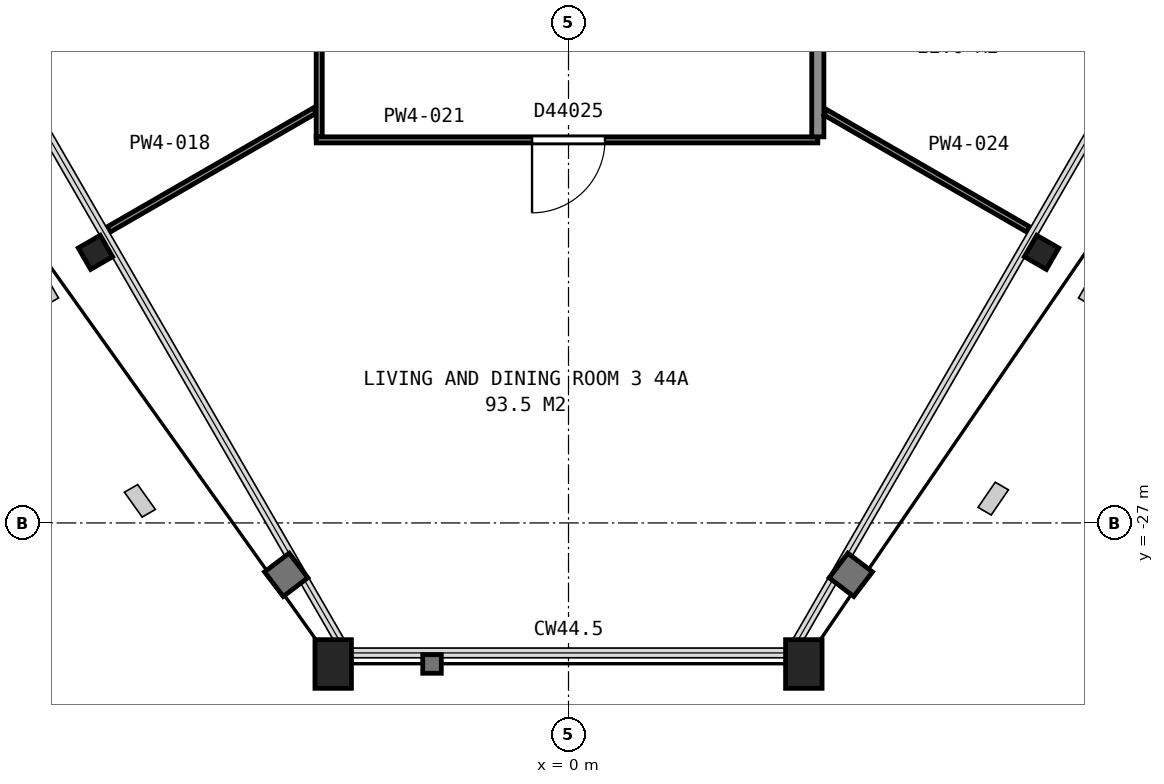
"""IFC4 building model, lengths in metres.
Left out: names, types, materials, properties, quantities, classifications, styles, units other than length and angle.
Written with IfcOpenShell. Run it as: python <this file> out.ifc"""

import sys

from ifc_helpers import new_model, si_unit, direction, frame, frame_2d, origin, origin_2d, place, context, subcontext, project, spatial, rectangle, hollow_rectangle, i_section, extrude, element, fill, save


model = new_model("IFC4")
c1 = context("Model", 3, precision=1e-05, world=origin(), true_north=direction((0.0, 1.0)))
c2 = subcontext(c1, "Body", "Model", "MODEL_VIEW")
j1 = project(units=[si_unit("LENGTHUNIT", "METRE"), si_unit("PLANEANGLEUNIT", "RADIAN")], contexts=[c1])
p1 = place(None, origin())
s1 = spatial("IfcSite", under=j1, at=p1, CompositionType="ELEMENT")
p2 = place(p1, origin())
s2 = spatial("IfcBuilding", under=s1, at=p2, CompositionType="ELEMENT")
p3 = place(p2, frame((0.0, 0.0, 178.4)))
s3 = spatial("IfcBuildingStorey", under=s2, at=p3, CompositionType="ELEMENT", Elevation=178.4)
p4 = place(p3, frame((-7.78, -22.55, 0.04), z_axis=(0.0, 0.0, 1.0), x_axis=(-0.5, 0.866025403784, 0.0)))
e1 = element("IfcColumn", 1, at=p4, inside=s3, PredefinedType="COLUMN", context=c2, shape_type="SweptSolid", body=[
    extrude(i_section(OverallWidth=0.406, OverallDepth=0.417, WebThickness=0.03, FlangeThickness=0.048, FilletRadius=0.015, at=origin_2d()), origin(), (0.0, 0.0, 1.0), 3.66),
])
for number, where, z_axis, x_axis in (
    (2, (-3.87, -29.32, 0.065), (0.0, 0.0, 1.0), (-1.0, 0.0, 0.0)),
    (3, (3.87, -29.32, 0.065), (0.0, 0.0, 1.0), (-1.0, 0.0, 0.0)),
):
    element("IfcColumn", number, at=place(p3, frame(where, z_axis=z_axis, x_axis=x_axis)), inside=s3, PredefinedType="COLUMN", context=c2, shape_type="SweptSolid", body=[
        extrude(hollow_rectangle(XDim=0.6, YDim=0.8, WallThickness=0.05, at=origin_2d()), origin(), (0.0, 0.0, 1.0), 3.635),
    ])
p5 = place(p3, frame((7.78, -22.55, 0.04), z_axis=(0.0, 0.0, 1.0), x_axis=(-0.5, -0.866025403784, 0.0)))
e4 = element("IfcColumn", 4, at=p5, inside=s3, PredefinedType="COLUMN", context=c2, shape_type="SweptSolid", body=[
    extrude(i_section(OverallWidth=0.406, OverallDepth=0.417, WebThickness=0.03, FlangeThickness=0.048, FilletRadius=0.015, at=origin_2d()), origin(), (0.0, 0.0, 1.0), 3.66),
])
p6 = place(p3, frame((-7.562, -22.173, 0.0), z_axis=(0.0, 0.0, 1.0), x_axis=(0.866079547155, 0.499906209203, 0.0)))
e5 = element("IfcWall", 5, at=p6, inside=s3, PredefinedType="PARTITIONING", context=c2, shape_type="SweptSolid", body=[
    extrude(rectangle(XDim=3.91, YDim=0.1, at=frame_2d((1.955, 0.0))), origin(), (0.0, 0.0, 1.0), 2.713),
])
p7 = place(p3, frame((-4.1, -20.65, 0.0), z_axis=(0.0, 0.0, 1.0), x_axis=(0.0, 1.0, 0.0)))
e6 = element("IfcWall", 6, at=p7, inside=s3, PredefinedType="PARTITIONING", context=c2, shape_type="SweptSolid", body=[
    extrude(rectangle(XDim=8.063, YDim=0.1, at=frame_2d((4.031, 0.0))), origin(), (0.0, 0.0, 1.0), 2.713),
])
p8 = place(p7, frame((6.892, 0.0, 0.0)))
e7 = element("IfcOpeningElement", 7, at=p8, cuts=e6, PredefinedType="OPENING", context=c2, shape_type="SweptSolid", body=[
    extrude(rectangle(XDim=0.9, YDim=2.1, at=frame_2d((0.45, 1.05))), frame((0.0, 0.06, 0.0), z_axis=(0.0, -1.0, 0.0), x_axis=(1.0, 0.0, 0.0)), (0.0, 0.0, 1.0), 0.12),
])
p9 = place(p7, frame((3.075, 0.0, 0.0)))
e8 = element("IfcOpeningElement", 8, at=p9, cuts=e6, PredefinedType="OPENING", context=c2, shape_type="SweptSolid", body=[
    extrude(rectangle(XDim=0.9, YDim=2.1, at=frame_2d((0.45, 1.05))), frame((0.0, 0.06, 0.0), z_axis=(0.0, -1.0, 0.0), x_axis=(1.0, 0.0, 0.0)), (0.0, 0.0, 1.0), 0.12),
])
p10 = place(p3, frame((4.1, -20.7, 0.0), z_axis=(0.0, 0.0, 1.0), x_axis=(-1.0, 0.0, 0.0)))
e9 = element("IfcWall", 9, at=p10, inside=s3, PredefinedType="PARTITIONING", context=c2, shape_type="SweptSolid", body=[
    extrude(rectangle(XDim=8.25, YDim=0.1, at=frame_2d((4.125, 0.0))), origin(), (0.0, 0.0, 1.0), 2.713),
])
p11 = place(p10, frame((3.5, 0.0, 0.0)))
e10 = element("IfcOpeningElement", 10, at=p11, cuts=e9, PredefinedType="OPENING", context=c2, shape_type="SweptSolid", body=[
    extrude(rectangle(XDim=1.2, YDim=2.1, at=frame_2d((0.6, 1.05))), frame((0.0, 0.06, 0.0), z_axis=(0.0, -1.0, 0.0), x_axis=(1.0, 0.0, 0.0)), (0.0, 0.0, 1.0), 0.12),
])
p12 = place(p3, frame((4.1, -12.527, 0.0), z_axis=(0.0, 0.0, 1.0), x_axis=(0.0, -1.0, 0.0)))
e11 = element("IfcWall", 11, at=p12, inside=s3, PredefinedType="PARTITIONING", context=c2, shape_type="SweptSolid", body=[
    extrude(rectangle(XDim=8.123, YDim=0.2, at=frame_2d((4.062, 0.0))), origin(), (0.0, 0.0, 1.0), 2.713),
])
p13 = place(p12, frame((4.598, 0.0, 0.0)))
e12 = element("IfcOpeningElement", 12, at=p13, cuts=e11, PredefinedType="OPENING", context=c2, shape_type="SweptSolid", body=[
    extrude(rectangle(XDim=0.9, YDim=2.1, at=frame_2d((0.45, 1.05))), frame((0.0, 0.11, 0.0), z_axis=(0.0, -1.0, 0.0), x_axis=(1.0, 0.0, 0.0)), (0.0, 0.0, 1.0), 0.22),
])
p14 = place(p3, frame((4.225, -20.247, 0.0), z_axis=(0.0, 0.0, 1.0), x_axis=(0.866070569679, -0.499921762215, 0.0)))
e13 = element("IfcWall", 13, at=p14, inside=s3, PredefinedType="PARTITIONING", context=c2, shape_type="SweptSolid", body=[
    extrude(rectangle(XDim=3.853, YDim=0.1, at=frame_2d((1.926, 0.0))), origin(), (0.0, 0.0, 1.0), 2.713),
])
p15 = place(p11, origin())
e14 = element("IfcDoor", 14, at=p15, inside=s3, OperationType="SINGLE_SWING_RIGHT", PredefinedType="DOOR", context=c2, shape_type="SweptSolid", body=[
    extrude(rectangle(XDim=1.2, YDim=2.1, at=frame_2d((0.6, 1.05))), frame((0.0, 0.025, 0.0), z_axis=(0.0, -1.0, 0.0), x_axis=(1.0, 0.0, 0.0)), (0.0, 0.0, 1.0), 0.05),
])
fill(e10, e14)
save(model, sys.argv[1])
